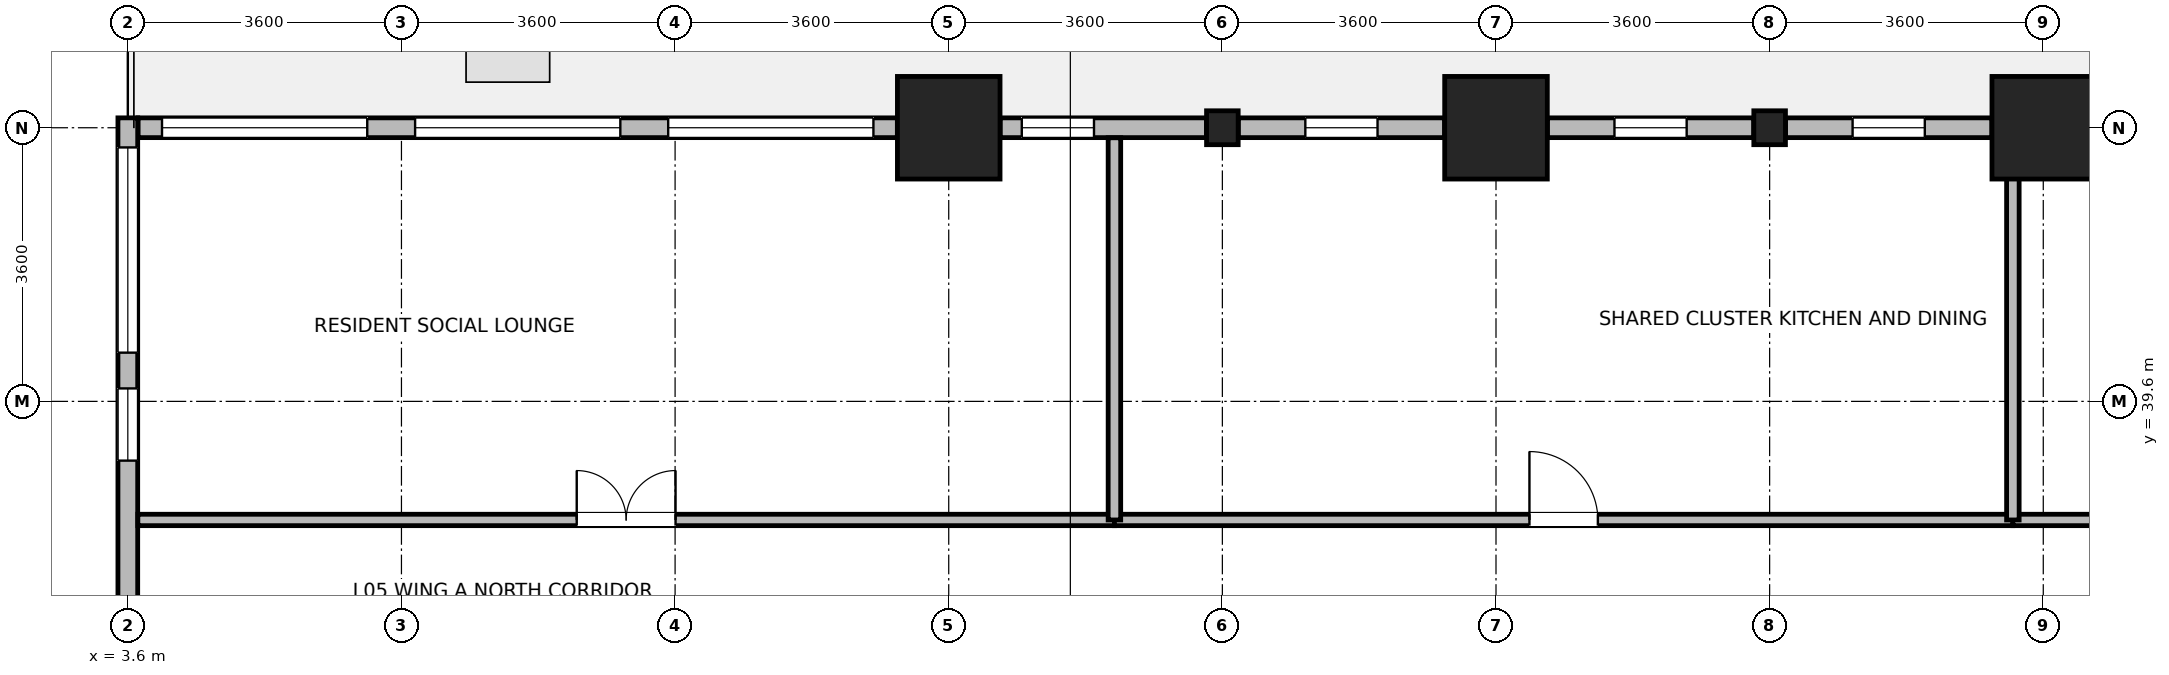
"""IFC4 building model, lengths in metres.
Left out: names, types, materials, properties, quantities, classifications, styles, units other than length and angle.
Written with IfcOpenShell. Run it as: python <this file> out.ifc"""

import sys

from ifc_helpers import new_model, si_unit, direction, frame, frame_2d, origin, origin_2d, place, context, subcontext, project, spatial, rectangle, i_section, extrude, source, transform, mapped, element, fill, save


model = new_model("IFC4")
c1 = context("Model", 3, precision=1e-05, world=origin(), true_north=direction((0.0, 1.0)))
c2 = subcontext(c1, "Body", "Model", "MODEL_VIEW")
j1 = project(units=[si_unit("LENGTHUNIT", "METRE"), si_unit("PLANEANGLEUNIT", "RADIAN")], contexts=[c1])
p1 = place(None, origin())
s1 = spatial("IfcSite", under=j1, at=p1, CompositionType="ELEMENT")
p2 = place(p1, origin())
s2 = spatial("IfcBuilding", under=s1, at=p2, CompositionType="ELEMENT")
p3 = place(p2, frame((0.0, 0.0, 25.3)))
s3 = spatial("IfcBuildingStorey", under=s2, at=p3, CompositionType="ELEMENT", Elevation=25.3)
m1 = source(origin(), c2, "Body", "SweptSolid", [
    extrude(rectangle(XDim=1.35, YDim=1.35, at=origin_2d()), origin(), (0.0, 0.0, 1.0), 3.7),
])
for number, where, z_axis, x_axis in (
    (1, (14.4, 43.2, 0.0), (0.0, 0.0, 1.0), (1.0, 0.0, 0.0)),
    (2, (21.6, 43.2, 0.0), (0.0, 0.0, 1.0), (1.0, 0.0, 0.0)),
    (3, (28.8, 43.2, 0.0), (0.0, 0.0, 1.0), (1.0, 0.0, 0.0)),
):
    element("IfcColumn", number, at=place(p3, frame(where, z_axis=z_axis, x_axis=x_axis)), inside=s3, PredefinedType="COLUMN", context=c2, shape_type="MappedRepresentation", body=[
        mapped(m1, transform((0.0, 0.0, 0.0), x_axis=(1.0, 0.0, 0.0), y_axis=(0.0, 1.0, 0.0), z_axis=(0.0, 0.0, 1.0), scale=1.0)),
    ])
m2 = source(origin(), c2, "Body", "SweptSolid", [
    extrude(i_section(OverallWidth=0.416, OverallDepth=0.446, WebThickness=0.029, FlangeThickness=0.04, FilletRadius=0.015, at=origin_2d()), origin(), (0.0, 0.0, 1.0), 3.7),
])
for number, where, z_axis, x_axis in (
    (4, (18.0, 43.2, 0.0), (0.0, 0.0, 1.0), (1.0, 0.0, 0.0)),
    (5, (25.2, 43.2, 0.0), (0.0, 0.0, 1.0), (1.0, 0.0, 0.0)),
):
    element("IfcColumn", number, at=place(p3, frame(where, z_axis=z_axis, x_axis=x_axis)), inside=s3, PredefinedType="COLUMN", context=c2, shape_type="MappedRepresentation", body=[
        mapped(m2, transform((0.0, 0.0, 0.0), x_axis=(1.0, 0.0, 0.0), y_axis=(0.0, 1.0, 0.0), z_axis=(0.0, 0.0, 1.0), scale=1.0)),
    ])
p4 = place(p3, frame((25.409, 43.2, 0.0), z_axis=(0.0, 0.0, 1.0), x_axis=(1.0, 0.0, 0.0)))
e6 = element("IfcWall", 6, at=p4, inside=s3, PredefinedType="STANDARD", context=c2, shape_type="SweptSolid", body=[
    extrude(rectangle(XDim=2.715, YDim=0.26, at=frame_2d((1.357, 0.0))), origin(), (0.0, 0.0, 1.0), 2.93),
])
p5 = place(p4, frame((0.883, 0.0, 0.85)))
e7 = element("IfcOpeningElement", 7, at=p5, cuts=e6, PredefinedType="OPENING", context=c2, shape_type="SweptSolid", body=[
    extrude(rectangle(XDim=0.95, YDim=1.75, at=frame_2d((0.475, 0.875))), frame((0.0, 0.14, 0.0), z_axis=(0.0, -1.0, 0.0), x_axis=(1.0, 0.0, 0.0)), (0.0, 0.0, 1.0), 0.28),
])
p6 = place(p3, frame((22.276, 43.2, 0.0), z_axis=(0.0, 0.0, 1.0), x_axis=(1.0, 0.0, 0.0)))
e8 = element("IfcWall", 8, at=p6, inside=s3, PredefinedType="STANDARD", context=c2, shape_type="SweptSolid", body=[
    extrude(rectangle(XDim=2.715, YDim=0.26, at=frame_2d((1.357, 0.0))), origin(), (0.0, 0.0, 1.0), 2.93),
])
p7 = place(p6, frame((0.883, 0.0, 0.85)))
e9 = element("IfcOpeningElement", 9, at=p7, cuts=e8, PredefinedType="OPENING", context=c2, shape_type="SweptSolid", body=[
    extrude(rectangle(XDim=0.95, YDim=1.75, at=frame_2d((0.475, 0.875))), frame((0.0, 0.14, 0.0), z_axis=(0.0, -1.0, 0.0), x_axis=(1.0, 0.0, 0.0)), (0.0, 0.0, 1.0), 0.28),
])
p8 = place(p3, frame((18.209, 43.2, 0.0), z_axis=(0.0, 0.0, 1.0), x_axis=(1.0, 0.0, 0.0)))
e10 = element("IfcWall", 10, at=p8, inside=s3, PredefinedType="STANDARD", context=c2, shape_type="SweptSolid", body=[
    extrude(rectangle(XDim=2.715, YDim=0.26, at=frame_2d((1.357, 0.0))), origin(), (0.0, 0.0, 1.0), 2.93),
])
p9 = place(p8, frame((0.883, 0.0, 0.85)))
e11 = element("IfcOpeningElement", 11, at=p9, cuts=e10, PredefinedType="OPENING", context=c2, shape_type="SweptSolid", body=[
    extrude(rectangle(XDim=0.95, YDim=1.75, at=frame_2d((0.475, 0.875))), frame((0.0, 0.14, 0.0), z_axis=(0.0, -1.0, 0.0), x_axis=(1.0, 0.0, 0.0)), (0.0, 0.0, 1.0), 0.28),
])
p10 = place(p3, frame((15.076, 43.2, 0.0), z_axis=(0.0, 0.0, 1.0), x_axis=(1.0, 0.0, 0.0)))
e12 = element("IfcWall", 12, at=p10, inside=s3, PredefinedType="STANDARD", context=c2, shape_type="SweptSolid", body=[
    extrude(rectangle(XDim=2.715, YDim=0.26, at=frame_2d((1.357, 0.0))), origin(), (0.0, 0.0, 1.0), 2.93),
])
p11 = place(p10, frame((0.285, 0.0, 0.85)))
e13 = element("IfcOpeningElement", 13, at=p11, cuts=e12, PredefinedType="OPENING", context=c2, shape_type="SweptSolid", body=[
    extrude(rectangle(XDim=0.95, YDim=1.75, at=frame_2d((0.475, 0.875))), frame((0.0, 0.14, 0.0), z_axis=(0.0, -1.0, 0.0), x_axis=(1.0, 0.0, 0.0)), (0.0, 0.0, 1.0), 0.28),
])
p12 = place(p3, frame((3.735, 43.2, 0.0), z_axis=(0.0, 0.0, 1.0), x_axis=(1.0, 0.0, 0.0)))
e14 = element("IfcWall", 14, at=p12, inside=s3, PredefinedType="STANDARD", context=c2, shape_type="SweptSolid", body=[
    extrude(rectangle(XDim=9.989, YDim=0.26, at=frame_2d((4.995, 0.0))), origin(), (0.0, 0.0, 1.0), 3.43),
])
p13 = place(p12, frame((0.315, 0.0, 0.85)))
e15 = element("IfcOpeningElement", 15, at=p13, cuts=e14, PredefinedType="OPENING", context=c2, shape_type="SweptSolid", body=[
    extrude(rectangle(XDim=2.7, YDim=2.05, at=frame_2d((1.35, 1.025))), frame((0.0, 0.14, 0.0), z_axis=(0.0, -1.0, 0.0), x_axis=(1.0, 0.0, 0.0)), (0.0, 0.0, 1.0), 0.28),
])
p14 = place(p12, frame((3.645, 0.0, 0.85)))
e16 = element("IfcOpeningElement", 16, at=p14, cuts=e14, PredefinedType="OPENING", context=c2, shape_type="SweptSolid", body=[
    extrude(rectangle(XDim=2.7, YDim=2.05, at=frame_2d((1.35, 1.025))), frame((0.0, 0.14, 0.0), z_axis=(0.0, -1.0, 0.0), x_axis=(1.0, 0.0, 0.0)), (0.0, 0.0, 1.0), 0.28),
])
p15 = place(p12, frame((6.974, 0.0, 0.85)))
e17 = element("IfcOpeningElement", 17, at=p15, cuts=e14, PredefinedType="OPENING", context=c2, shape_type="SweptSolid", body=[
    extrude(rectangle(XDim=2.7, YDim=2.05, at=frame_2d((1.35, 1.025))), frame((0.0, 0.14, 0.0), z_axis=(0.0, -1.0, 0.0), x_axis=(1.0, 0.0, 0.0)), (0.0, 0.0, 1.0), 0.28),
])
p16 = place(p3, frame((3.6, 36.374, 0.0), z_axis=(0.0, 0.0, 1.0), x_axis=(0.0, 1.0, 0.0)))
e18 = element("IfcWall", 18, at=p16, inside=s3, PredefinedType="STANDARD", context=c2, shape_type="SweptSolid", body=[
    extrude(rectangle(XDim=6.956, YDim=0.26, at=frame_2d((3.478, 0.0))), origin(), (0.0, 0.0, 1.0), 3.43),
])
p17 = place(p16, frame((3.867, 0.0, 0.85)))
e19 = element("IfcOpeningElement", 19, at=p17, cuts=e18, PredefinedType="OPENING", context=c2, shape_type="SweptSolid", body=[
    extrude(rectangle(XDim=2.7, YDim=2.05, at=frame_2d((1.35, 1.025))), frame((0.0, 0.14, 0.0), z_axis=(0.0, -1.0, 0.0), x_axis=(1.0, 0.0, 0.0)), (0.0, 0.0, 1.0), 0.28),
])
p18 = place(p16, frame((2.447, 0.0, 0.85)))
e20 = element("IfcOpeningElement", 20, at=p18, cuts=e18, PredefinedType="OPENING", context=c2, shape_type="SweptSolid", body=[
    extrude(rectangle(XDim=0.95, YDim=1.75, at=frame_2d((0.475, 0.875))), frame((0.0, 0.14, 0.0), z_axis=(0.0, -1.0, 0.0), x_axis=(1.0, 0.0, 0.0)), (0.0, 0.0, 1.0), 0.28),
])
p19 = place(p3, frame((3.732, 38.04, 0.0), z_axis=(0.0, 0.0, 1.0), x_axis=(1.0, 0.0, 0.0)))
e21 = element("IfcWall", 21, at=p19, inside=s3, PredefinedType="PARTITIONING", context=c2, shape_type="SweptSolid", body=[
    extrude(rectangle(XDim=12.848, YDim=0.15, at=frame_2d((6.424, 0.0))), origin(), (0.0, 0.0, 1.0), 3.43),
])
p20 = place(p19, frame((5.774, 0.0, 0.0)))
e22 = element("IfcOpeningElement", 22, at=p20, cuts=e21, PredefinedType="OPENING", context=c2, shape_type="SweptSolid", body=[
    extrude(rectangle(XDim=1.3, YDim=2.12, at=frame_2d((0.65, 1.06))), frame((0.0, 0.085, 0.0), z_axis=(0.0, -1.0, 0.0), x_axis=(1.0, 0.0, 0.0)), (0.0, 0.0, 1.0), 0.17),
])
p21 = place(p3, frame((16.58, 38.04, 0.0), z_axis=(0.0, 0.0, 1.0), x_axis=(1.0, 0.0, 0.0)))
e23 = element("IfcWall", 23, at=p21, inside=s3, PredefinedType="PARTITIONING", context=c2, shape_type="SweptSolid", body=[
    extrude(rectangle(XDim=11.82, YDim=0.15, at=frame_2d((5.91, 0.0))), origin(), (0.0, 0.0, 1.0), 3.43),
])
p22 = place(p21, frame((5.46, 0.0, 0.0)))
e24 = element("IfcOpeningElement", 24, at=p22, cuts=e23, PredefinedType="OPENING", context=c2, shape_type="SweptSolid", body=[
    extrude(rectangle(XDim=0.9, YDim=2.08, at=frame_2d((0.45, 1.04))), frame((0.0, 0.085, 0.0), z_axis=(0.0, -1.0, 0.0), x_axis=(1.0, 0.0, 0.0)), (0.0, 0.0, 1.0), 0.17),
])
p23 = place(p3, frame((28.4, 38.04, 0.0), z_axis=(0.0, 0.0, 1.0), x_axis=(1.0, 0.0, 0.0)))
e25 = element("IfcWall", 25, at=p23, inside=s3, PredefinedType="PARTITIONING", context=c2, shape_type="SweptSolid", body=[
    extrude(rectangle(XDim=9.82, YDim=0.15, at=frame_2d((4.91, 0.0))), origin(), (0.0, 0.0, 1.0), 3.43),
])
p24 = place(p23, frame((4.26, 0.0, 0.0)))
e26 = element("IfcOpeningElement", 26, at=p24, cuts=e25, PredefinedType="OPENING", context=c2, shape_type="SweptSolid", body=[
    extrude(rectangle(XDim=1.3, YDim=2.12, at=frame_2d((0.65, 1.06))), frame((0.0, 0.085, 0.0), z_axis=(0.0, -1.0, 0.0), x_axis=(1.0, 0.0, 0.0)), (0.0, 0.0, 1.0), 0.17),
])
for number, where, z_axis, x_axis in (
    (27, (16.58, 38.04, 0.0), (0.0, 0.0, 1.0), (0.0, 1.0, 0.0)),
    (28, (28.4, 38.04, 0.0), (0.0, 0.0, 1.0), (0.0, 1.0, 0.0)),
):
    element("IfcWall", number, at=place(p3, frame(where, z_axis=z_axis, x_axis=x_axis)), inside=s3, PredefinedType="PARTITIONING", context=c2, shape_type="SweptSolid", body=[
        extrude(rectangle(XDim=5.028, YDim=0.165, at=frame_2d((2.514, 0.0))), origin(), (0.0, 0.0, 1.0), 3.43),
    ])
p25 = place(p5, origin())
e29 = element("IfcWindow", 29, at=p25, inside=s3, PartitioningType="SINGLE_PANEL", PredefinedType="WINDOW", context=c2, shape_type="SweptSolid", body=[
    extrude(rectangle(XDim=0.95, YDim=1.75, at=frame_2d((0.475, 0.875))), frame((0.0, 0.03, 0.0), z_axis=(0.0, -1.0, 0.0), x_axis=(1.0, 0.0, 0.0)), (0.0, 0.0, 1.0), 0.06),
])
fill(e7, e29)
p26 = place(p7, origin())
e30 = element("IfcWindow", 30, at=p26, inside=s3, PartitioningType="SINGLE_PANEL", PredefinedType="WINDOW", context=c2, shape_type="SweptSolid", body=[
    extrude(rectangle(XDim=0.95, YDim=1.75, at=frame_2d((0.475, 0.875))), frame((0.0, 0.03, 0.0), z_axis=(0.0, -1.0, 0.0), x_axis=(1.0, 0.0, 0.0)), (0.0, 0.0, 1.0), 0.06),
])
fill(e9, e30)
p27 = place(p9, origin())
e31 = element("IfcWindow", 31, at=p27, inside=s3, PartitioningType="SINGLE_PANEL", PredefinedType="WINDOW", context=c2, shape_type="SweptSolid", body=[
    extrude(rectangle(XDim=0.95, YDim=1.75, at=frame_2d((0.475, 0.875))), frame((0.0, 0.03, 0.0), z_axis=(0.0, -1.0, 0.0), x_axis=(1.0, 0.0, 0.0)), (0.0, 0.0, 1.0), 0.06),
])
fill(e11, e31)
p28 = place(p11, origin())
e32 = element("IfcWindow", 32, at=p28, inside=s3, PartitioningType="SINGLE_PANEL", PredefinedType="WINDOW", context=c2, shape_type="SweptSolid", body=[
    extrude(rectangle(XDim=0.95, YDim=1.75, at=frame_2d((0.475, 0.875))), frame((0.0, 0.03, 0.0), z_axis=(0.0, -1.0, 0.0), x_axis=(1.0, 0.0, 0.0)), (0.0, 0.0, 1.0), 0.06),
])
fill(e13, e32)
p29 = place(p13, origin())
e33 = element("IfcWindow", 33, at=p29, inside=s3, PartitioningType="SINGLE_PANEL", PredefinedType="WINDOW", context=c2, shape_type="SweptSolid", body=[
    extrude(rectangle(XDim=2.7, YDim=2.05, at=frame_2d((1.35, 1.025))), frame((0.0, 0.03, 0.0), z_axis=(0.0, -1.0, 0.0), x_axis=(1.0, 0.0, 0.0)), (0.0, 0.0, 1.0), 0.06),
])
fill(e15, e33)
p30 = place(p14, origin())
e34 = element("IfcWindow", 34, at=p30, inside=s3, PartitioningType="SINGLE_PANEL", PredefinedType="WINDOW", context=c2, shape_type="SweptSolid", body=[
    extrude(rectangle(XDim=2.7, YDim=2.05, at=frame_2d((1.35, 1.025))), frame((0.0, 0.03, 0.0), z_axis=(0.0, -1.0, 0.0), x_axis=(1.0, 0.0, 0.0)), (0.0, 0.0, 1.0), 0.06),
])
fill(e16, e34)
p31 = place(p15, origin())
e35 = element("IfcWindow", 35, at=p31, inside=s3, PartitioningType="SINGLE_PANEL", PredefinedType="WINDOW", context=c2, shape_type="SweptSolid", body=[
    extrude(rectangle(XDim=2.7, YDim=2.05, at=frame_2d((1.35, 1.025))), frame((0.0, 0.03, 0.0), z_axis=(0.0, -1.0, 0.0), x_axis=(1.0, 0.0, 0.0)), (0.0, 0.0, 1.0), 0.06),
])
fill(e17, e35)
p32 = place(p17, origin())
e36 = element("IfcWindow", 36, at=p32, inside=s3, PartitioningType="SINGLE_PANEL", PredefinedType="WINDOW", context=c2, shape_type="SweptSolid", body=[
    extrude(rectangle(XDim=2.7, YDim=2.05, at=frame_2d((1.35, 1.025))), frame((0.0, 0.03, 0.0), z_axis=(0.0, -1.0, 0.0), x_axis=(1.0, 0.0, 0.0)), (0.0, 0.0, 1.0), 0.06),
])
fill(e19, e36)
p33 = place(p18, origin())
e37 = element("IfcWindow", 37, at=p33, inside=s3, PartitioningType="SINGLE_PANEL", PredefinedType="WINDOW", context=c2, shape_type="SweptSolid", body=[
    extrude(rectangle(XDim=0.95, YDim=1.75, at=frame_2d((0.475, 0.875))), frame((0.0, 0.03, 0.0), z_axis=(0.0, -1.0, 0.0), x_axis=(1.0, 0.0, 0.0)), (0.0, 0.0, 1.0), 0.06),
])
fill(e20, e37)
p34 = place(p20, origin())
e38 = element("IfcDoor", 38, at=p34, inside=s3, OperationType="DOUBLE_DOOR_SINGLE_SWING", PredefinedType="DOOR", context=c2, shape_type="SweptSolid", body=[
    extrude(rectangle(XDim=1.3, YDim=2.12, at=frame_2d((0.65, 1.06))), frame((0.0, 0.025, 0.0), z_axis=(0.0, -1.0, 0.0), x_axis=(1.0, 0.0, 0.0)), (0.0, 0.0, 1.0), 0.05),
])
fill(e22, e38)
p35 = place(p22, origin())
e39 = element("IfcDoor", 39, at=p35, inside=s3, OperationType="SINGLE_SWING_LEFT", PredefinedType="DOOR", context=c2, shape_type="SweptSolid", body=[
    extrude(rectangle(XDim=0.9, YDim=2.08, at=frame_2d((0.45, 1.04))), frame((0.0, 0.025, 0.0), z_axis=(0.0, -1.0, 0.0), x_axis=(1.0, 0.0, 0.0)), (0.0, 0.0, 1.0), 0.05),
])
fill(e24, e39)
save(model, sys.argv[1])
